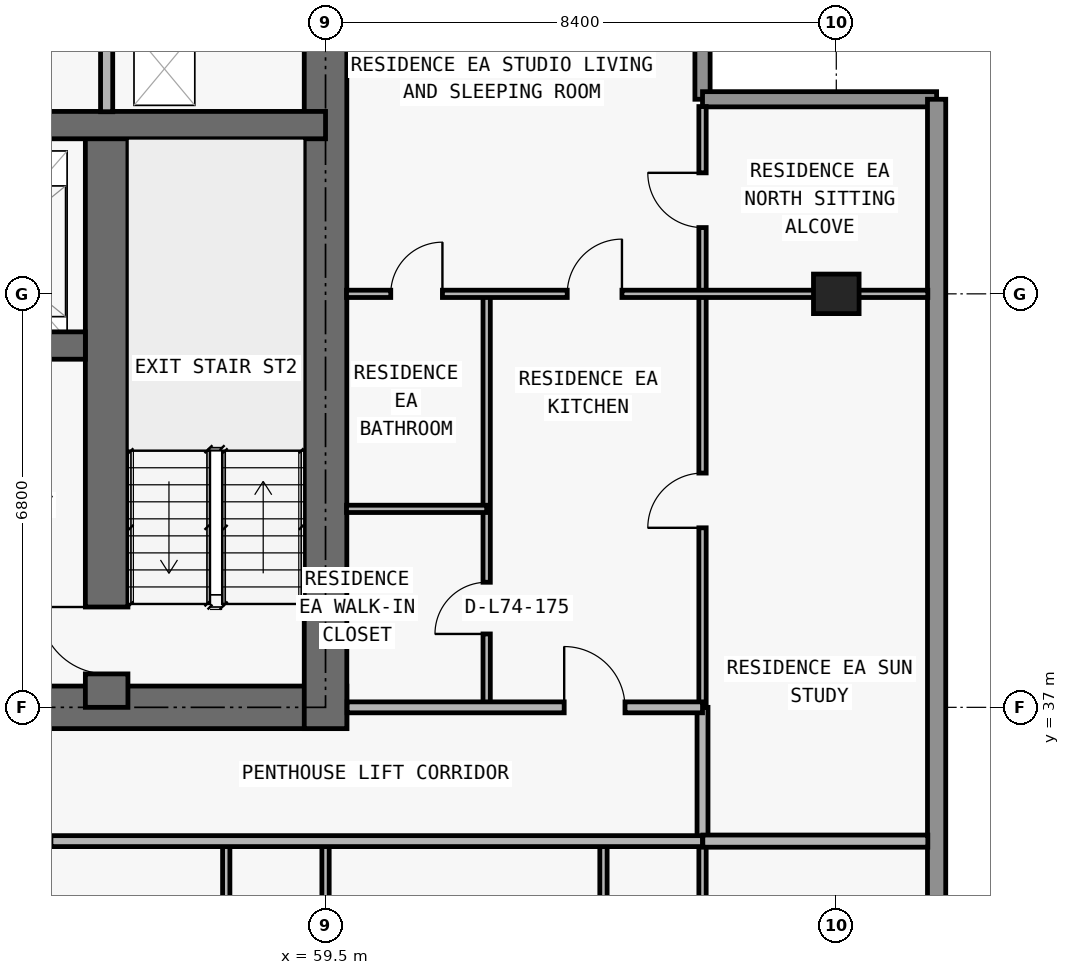
"""IFC4 building model, lengths in metres.
Left out: names, types, materials, properties, quantities, classifications, styles, units other than length and angle.
Written with IfcOpenShell. Run it as: python <this file> out.ifc"""

import sys

from ifc_helpers import new_model, si_unit, direction, frame, frame_2d, origin, origin_2d, place, context, subcontext, project, spatial, rectangle, extrude, element, fill, save


model = new_model("IFC4")
c1 = context("Model", 3, precision=1e-05, world=origin(), true_north=direction((0.0, 1.0)))
c2 = subcontext(c1, "Body", "Model", "MODEL_VIEW")
j1 = project(units=[si_unit("LENGTHUNIT", "METRE"), si_unit("PLANEANGLEUNIT", "RADIAN")], contexts=[c1])
p1 = place(None, origin())
s1 = spatial("IfcSite", under=j1, at=p1, CompositionType="ELEMENT")
p2 = place(p1, origin())
s2 = spatial("IfcBuilding", under=s1, at=p2, CompositionType="ELEMENT")
p3 = place(p2, frame((0.0, 0.0, 262.8)))
s3 = spatial("IfcBuildingStorey", under=s2, at=p3, CompositionType="ELEMENT", Elevation=262.8)
p4 = place(p3, frame((67.9, 43.8, 0.0), z_axis=(0.0, 0.0, 1.0), x_axis=(1.0, 0.0, 0.0)))
e1 = element("IfcColumn", 1, at=p4, inside=s3, PredefinedType="COLUMN", context=c2, shape_type="SweptSolid", body=[
    extrude(rectangle(XDim=0.75, YDim=0.65, at=origin_2d()), origin(), (0.0, 0.0, 1.0), 3.05),
])
p5 = place(p3, frame((17.95, 37.0, 0.0), z_axis=(0.0, 0.0, 1.0), x_axis=(1.0, 0.0, 0.0)))
e2 = element("IfcWall", 2, at=p5, inside=s3, PredefinedType="SHEAR", context=c2, shape_type="SweptSolid", body=[
    extrude(rectangle(XDim=41.9, YDim=0.7, at=frame_2d((20.95, 0.0))), origin(), (0.0, 0.0, 1.0), 3.05),
])
p6 = place(p5, frame((14.35, 0.0, 0.0)))
e3 = element("IfcOpeningElement", 3, at=p6, cuts=e2, PredefinedType="OPENING", context=c2, shape_type="SweptSolid", body=[
    extrude(rectangle(XDim=1.1, YDim=2.15, at=frame_2d((0.55, 1.075))), frame((0.0, 0.36, 0.0), z_axis=(0.0, -1.0, 0.0), x_axis=(1.0, 0.0, 0.0)), (0.0, 0.0, 1.0), 0.72),
])
p7 = place(p5, frame((6.2, 0.0, 0.0)))
e4 = element("IfcOpeningElement", 4, at=p7, cuts=e2, PredefinedType="OPENING", context=c2, shape_type="SweptSolid", body=[
    extrude(rectangle(XDim=1.05, YDim=2.15, at=frame_2d((0.525, 1.075))), frame((0.0, 0.36, 0.0), z_axis=(0.0, -1.0, 0.0), x_axis=(1.0, 0.0, 0.0)), (0.0, 0.0, 1.0), 0.72),
])
p8 = place(p5, frame((34.7, 0.0, 0.0)))
e5 = element("IfcOpeningElement", 5, at=p8, cuts=e2, PredefinedType="OPENING", context=c2, shape_type="SweptSolid", body=[
    extrude(rectangle(XDim=1.05, YDim=2.15, at=frame_2d((0.525, 1.075))), frame((0.0, 0.36, 0.0), z_axis=(0.0, -1.0, 0.0), x_axis=(1.0, 0.0, 0.0)), (0.0, 0.0, 1.0), 0.72),
])
p9 = place(p5, frame((10.812, 0.0, 0.0)))
e6 = element("IfcOpeningElement", 6, at=p9, cuts=e2, PredefinedType="OPENING", context=c2, shape_type="SweptSolid", body=[
    extrude(rectangle(XDim=1.05, YDim=2.15, at=frame_2d((0.525, 1.075))), frame((0.0, 0.36, 0.0), z_axis=(0.0, -1.0, 0.0), x_axis=(1.0, 0.0, 0.0)), (0.0, 0.0, 1.0), 0.72),
])
p10 = place(p5, frame((24.05, 0.0, 0.0)))
e7 = element("IfcOpeningElement", 7, at=p10, cuts=e2, PredefinedType="OPENING", context=c2, shape_type="SweptSolid", body=[
    extrude(rectangle(XDim=1.05, YDim=2.15, at=frame_2d((0.525, 1.075))), frame((0.0, 0.36, 0.0), z_axis=(0.0, -1.0, 0.0), x_axis=(1.0, 0.0, 0.0)), (0.0, 0.0, 1.0), 0.72),
])
p11 = place(p3, frame((59.5, 36.65, 0.0), z_axis=(0.0, 0.0, 1.0), x_axis=(0.0, 1.0, 0.0)))
e8 = element("IfcWall", 8, at=p11, inside=s3, PredefinedType="SHEAR", context=c2, shape_type="SweptSolid", body=[
    extrude(rectangle(XDim=13.95, YDim=0.7, at=frame_2d((6.975, 0.0))), origin(), (0.0, 0.0, 1.0), 3.05),
])
p12 = place(p3, frame((55.9, 37.0, 0.0), z_axis=(0.0, 0.0, 1.0), x_axis=(0.0, 1.0, 0.0)))
e9 = element("IfcWall", 9, at=p12, inside=s3, PredefinedType="SHEAR", context=c2, shape_type="SweptSolid", body=[
    extrude(rectangle(XDim=9.575, YDim=0.7, at=frame_2d((4.788, 0.0))), origin(), (0.0, 0.0, 1.0), 3.05),
])
p13 = place(p12, frame((0.55, 0.0, 0.0)))
e10 = element("IfcOpeningElement", 10, at=p13, cuts=e9, PredefinedType="OPENING", context=c2, shape_type="SweptSolid", body=[
    extrude(rectangle(XDim=1.1, YDim=2.15, at=frame_2d((0.55, 1.075))), frame((0.0, 0.36, 0.0), z_axis=(0.0, -1.0, 0.0), x_axis=(1.0, 0.0, 0.0)), (0.0, 0.0, 1.0), 0.72),
])
p14 = place(p3, frame((22.25, 42.95, 0.0), z_axis=(0.0, 0.0, 1.0), x_axis=(1.0, 0.0, 0.0)))
e11 = element("IfcWall", 11, at=p14, inside=s3, PredefinedType="SHEAR", context=c2, shape_type="SweptSolid", body=[
    extrude(rectangle(XDim=33.3, YDim=0.45, at=frame_2d((16.65, 0.0))), origin(), (0.0, 0.0, 1.0), 3.05),
])
p15 = place(p14, frame((1.05, 0.0, 0.0)))
e12 = element("IfcOpeningElement", 12, at=p15, cuts=e11, PredefinedType="OPENING", context=c2, shape_type="SweptSolid", body=[
    extrude(rectangle(XDim=1.2, YDim=2.2, at=frame_2d((0.6, 1.1))), frame((0.0, 0.235, 0.0), z_axis=(0.0, -1.0, 0.0), x_axis=(1.0, 0.0, 0.0)), (0.0, 0.0, 1.0), 0.47),
])
p16 = place(p14, frame((31.05, 0.0, 0.0)))
e13 = element("IfcOpeningElement", 13, at=p16, cuts=e11, PredefinedType="OPENING", context=c2, shape_type="SweptSolid", body=[
    extrude(rectangle(XDim=1.2, YDim=2.2, at=frame_2d((0.6, 1.1))), frame((0.0, 0.235, 0.0), z_axis=(0.0, -1.0, 0.0), x_axis=(1.0, 0.0, 0.0)), (0.0, 0.0, 1.0), 0.47),
])
p17 = place(p14, frame((26.45, 0.0, 0.0)))
e14 = element("IfcOpeningElement", 14, at=p17, cuts=e11, PredefinedType="OPENING", context=c2, shape_type="SweptSolid", body=[
    extrude(rectangle(XDim=1.1, YDim=2.2, at=frame_2d((0.55, 1.1))), frame((0.0, 0.235, 0.0), z_axis=(0.0, -1.0, 0.0), x_axis=(1.0, 0.0, 0.0)), (0.0, 0.0, 1.0), 0.47),
])
p18 = place(p14, frame((5.95, 0.0, 0.0)))
e15 = element("IfcOpeningElement", 15, at=p18, cuts=e11, PredefinedType="OPENING", context=c2, shape_type="SweptSolid", body=[
    extrude(rectangle(XDim=1.1, YDim=2.2, at=frame_2d((0.55, 1.1))), frame((0.0, 0.235, 0.0), z_axis=(0.0, -1.0, 0.0), x_axis=(1.0, 0.0, 0.0)), (0.0, 0.0, 1.0), 0.47),
])
p19 = place(p14, frame((3.625, 0.0, 0.0)))
e16 = element("IfcOpeningElement", 16, at=p19, cuts=e11, PredefinedType="OPENING", context=c2, shape_type="SweptSolid", body=[
    extrude(rectangle(XDim=1.05, YDim=2.15, at=frame_2d((0.525, 1.075))), frame((0.0, 0.235, 0.0), z_axis=(0.0, -1.0, 0.0), x_axis=(1.0, 0.0, 0.0)), (0.0, 0.0, 1.0), 0.47),
])
p20 = place(p14, frame((28.675, 0.0, 0.0)))
e17 = element("IfcOpeningElement", 17, at=p20, cuts=e11, PredefinedType="OPENING", context=c2, shape_type="SweptSolid", body=[
    extrude(rectangle(XDim=1.05, YDim=2.15, at=frame_2d((0.525, 1.075))), frame((0.0, 0.235, 0.0), z_axis=(0.0, -1.0, 0.0), x_axis=(1.0, 0.0, 0.0)), (0.0, 0.0, 1.0), 0.47),
])
p21 = place(p14, frame((14.7, 0.0, 0.0)))
e18 = element("IfcOpeningElement", 18, at=p21, cuts=e11, PredefinedType="OPENING", context=c2, shape_type="SweptSolid", body=[
    extrude(rectangle(XDim=1.0, YDim=2.2, at=frame_2d((0.5, 1.1))), frame((0.0, 0.235, 0.0), z_axis=(0.0, -1.0, 0.0), x_axis=(1.0, 0.0, 0.0)), (0.0, 0.0, 1.0), 0.47),
])
p22 = place(p14, frame((21.45, 0.0, 0.0)))
e19 = element("IfcOpeningElement", 19, at=p22, cuts=e11, PredefinedType="OPENING", context=c2, shape_type="SweptSolid", body=[
    extrude(rectangle(XDim=1.0, YDim=2.2, at=frame_2d((0.5, 1.1))), frame((0.0, 0.235, 0.0), z_axis=(0.0, -1.0, 0.0), x_axis=(1.0, 0.0, 0.0)), (0.0, 0.0, 1.0), 0.47),
])
p23 = place(p3, frame((18.3, 46.575, 0.0), z_axis=(0.0, 0.0, 1.0), x_axis=(1.0, 0.0, 0.0)))
e20 = element("IfcWall", 20, at=p23, inside=s3, PredefinedType="SHEAR", context=c2, shape_type="SweptSolid", body=[
    extrude(rectangle(XDim=41.2, YDim=0.45, at=frame_2d((20.6, 0.0))), origin(), (0.0, 0.0, 1.0), 3.05),
])
p24 = place(p23, frame((7.6, 0.0, 0.0)))
e21 = element("IfcOpeningElement", 21, at=p24, cuts=e20, PredefinedType="OPENING", context=c2, shape_type="SweptSolid", body=[
    extrude(rectangle(XDim=1.0, YDim=2.2, at=frame_2d((0.5, 1.1))), frame((0.0, 0.235, 0.0), z_axis=(0.0, -1.0, 0.0), x_axis=(1.0, 0.0, 0.0)), (0.0, 0.0, 1.0), 0.47),
])
p25 = place(p23, frame((32.625, 0.0, 0.0)))
e22 = element("IfcOpeningElement", 22, at=p25, cuts=e20, PredefinedType="OPENING", context=c2, shape_type="SweptSolid", body=[
    extrude(rectangle(XDim=1.05, YDim=2.15, at=frame_2d((0.525, 1.075))), frame((0.0, 0.235, 0.0), z_axis=(0.0, -1.0, 0.0), x_axis=(1.0, 0.0, 0.0)), (0.0, 0.0, 1.0), 0.47),
])
p26 = place(p3, frame((65.7, 50.45, 0.0), z_axis=(0.0, 0.0, 1.0), x_axis=(0.0, -1.0, 0.0)))
e23 = element("IfcWall", 23, at=p26, inside=s3, PredefinedType="ELEMENTEDWALL", context=c2, shape_type="SweptSolid", body=[
    extrude(rectangle(XDim=3.45, YDim=0.25, at=frame_2d((1.725, 0.0))), origin(), (0.0, 0.0, 1.0), 3.05),
])
p27 = place(p3, frame((65.7, 47.0, 0.0), z_axis=(0.0, 0.0, 1.0), x_axis=(1.0, 0.0, 0.0)))
e24 = element("IfcWall", 24, at=p27, inside=s3, PredefinedType="ELEMENTEDWALL", context=c2, shape_type="SweptSolid", body=[
    extrude(rectangle(XDim=3.85, YDim=0.25, at=frame_2d((1.925, 0.0))), origin(), (0.0, 0.0, 1.0), 3.05),
])
p28 = place(p3, frame((69.55, 47.0, 0.0), z_axis=(0.0, 0.0, 1.0), x_axis=(0.0, -1.0, 0.0)))
e25 = element("IfcWall", 25, at=p28, inside=s3, PredefinedType="STANDARD", context=c2, shape_type="SweptSolid", body=[
    extrude(rectangle(XDim=16.85, YDim=0.3, at=frame_2d((8.425, 0.0))), origin(), (0.0, 0.0, 1.0), 3.05),
])
p29 = place(p3, frame((55.9, 46.795, 0.0), z_axis=(0.0, 0.0, 1.0), x_axis=(0.0, 1.0, 0.0)))
e26 = element("IfcWall", 26, at=p29, inside=s3, PredefinedType="PARTITIONING", context=c2, shape_type="SweptSolid", body=[
    extrude(rectangle(XDim=3.16, YDim=0.2, at=frame_2d((1.58, 0.0))), origin(), (0.0, 0.0, 1.0), 3.05),
])
p30 = place(p3, frame((57.867, 30.84, 0.0), z_axis=(0.0, 0.0, 1.0), x_axis=(0.0, 1.0, 0.0)))
e27 = element("IfcWall", 27, at=p30, inside=s3, PredefinedType="PARTITIONING", context=c2, shape_type="SweptSolid", body=[
    extrude(rectangle(XDim=3.96, YDim=0.12, at=frame_2d((1.98, 0.0))), origin(), (0.0, 0.0, 1.0), 3.05),
])
p31 = place(p30, frame((1.555, 0.0, 0.0)))
e28 = element("IfcOpeningElement", 28, at=p31, cuts=e27, PredefinedType="OPENING", context=c2, shape_type="SweptSolid", body=[
    extrude(rectangle(XDim=0.85, YDim=2.1, at=frame_2d((0.425, 1.05))), frame((0.0, 0.07, 0.0), z_axis=(0.0, -1.0, 0.0), x_axis=(1.0, 0.0, 0.0)), (0.0, 0.0, 1.0), 0.14),
])
p32 = place(p3, frame((59.5, 30.84, 0.0), z_axis=(0.0, 0.0, 1.0), x_axis=(0.0, 1.0, 0.0)))
e29 = element("IfcWall", 29, at=p32, inside=s3, PredefinedType="PARTITIONING", context=c2, shape_type="SweptSolid", body=[
    extrude(rectangle(XDim=3.96, YDim=0.12, at=frame_2d((1.98, 0.0))), origin(), (0.0, 0.0, 1.0), 2.263),
])
p33 = place(p3, frame((62.15, 37.0, 0.0), z_axis=(0.0, 0.0, 1.0), x_axis=(0.0, 1.0, 0.0)))
e30 = element("IfcWall", 30, at=p33, inside=s3, PredefinedType="PARTITIONING", context=c2, shape_type="SweptSolid", body=[
    extrude(rectangle(XDim=6.8, YDim=0.12, at=frame_2d((3.4, 0.0))), origin(), (0.0, 0.0, 1.0), 3.05),
])
p34 = place(p33, frame((1.207, 0.0, 0.0)))
e31 = element("IfcOpeningElement", 31, at=p34, cuts=e30, PredefinedType="OPENING", context=c2, shape_type="SweptSolid", body=[
    extrude(rectangle(XDim=0.85, YDim=2.1, at=frame_2d((0.425, 1.05))), frame((0.0, 0.07, 0.0), z_axis=(0.0, -1.0, 0.0), x_axis=(1.0, 0.0, 0.0)), (0.0, 0.0, 1.0), 0.14),
])
p35 = place(p3, frame((64.071, 30.84, 0.0), z_axis=(0.0, 0.0, 1.0), x_axis=(0.0, 1.0, 0.0)))
e32 = element("IfcWall", 32, at=p35, inside=s3, PredefinedType="PARTITIONING", context=c2, shape_type="SweptSolid", body=[
    extrude(rectangle(XDim=3.96, YDim=0.12, at=frame_2d((1.98, 0.0))), origin(), (0.0, 0.0, 1.0), 3.05),
])
p36 = place(p35, frame((1.555, 0.0, 0.0)))
e33 = element("IfcOpeningElement", 33, at=p36, cuts=e32, PredefinedType="OPENING", context=c2, shape_type="SweptSolid", body=[
    extrude(rectangle(XDim=0.85, YDim=2.1, at=frame_2d((0.425, 1.05))), frame((0.0, 0.07, 0.0), z_axis=(0.0, -1.0, 0.0), x_axis=(1.0, 0.0, 0.0)), (0.0, 0.0, 1.0), 0.14),
])
p37 = place(p3, frame((65.7, 30.84, 0.0), z_axis=(0.0, 0.0, 1.0), x_axis=(0.0, 1.0, 0.0)))
e34 = element("IfcWall", 34, at=p37, inside=s3, PredefinedType="PARTITIONING", context=c2, shape_type="SweptSolid", body=[
    extrude(rectangle(XDim=3.96, YDim=0.12, at=frame_2d((1.98, 0.0))), origin(), (0.0, 0.0, 1.0), 2.629),
])
p38 = place(p3, frame((65.7, 34.805, 0.0), z_axis=(0.0, 0.0, 1.0), x_axis=(0.0, 1.0, 0.0)))
e35 = element("IfcWall", 35, at=p38, inside=s3, PredefinedType="PARTITIONING", context=c2, shape_type="SweptSolid", body=[
    extrude(rectangle(XDim=2.195, YDim=0.18, at=frame_2d((1.098, 0.0))), origin(), (0.0, 0.0, 1.0), 2.629),
])
p39 = place(p3, frame((65.7, 37.005, 0.0), z_axis=(0.0, 0.0, 1.0), x_axis=(0.0, 1.0, 0.0)))
e36 = element("IfcWall", 36, at=p39, inside=s3, PredefinedType="PARTITIONING", context=c2, shape_type="SweptSolid", body=[
    extrude(rectangle(XDim=9.875, YDim=0.12, at=frame_2d((4.938, 0.0))), origin(), (0.0, 0.0, 1.0), 2.629),
])
p40 = place(p39, frame((2.948, 0.0, 0.0)))
e37 = element("IfcOpeningElement", 37, at=p40, cuts=e36, PredefinedType="OPENING", context=c2, shape_type="SweptSolid", body=[
    extrude(rectangle(XDim=0.9, YDim=2.15, at=frame_2d((0.45, 1.075))), frame((0.0, 0.07, 0.0), z_axis=(0.0, -1.0, 0.0), x_axis=(1.0, 0.0, 0.0)), (0.0, 0.0, 1.0), 0.14),
])
p41 = place(p39, frame((7.885, 0.0, 0.0)))
e38 = element("IfcOpeningElement", 38, at=p41, cuts=e36, PredefinedType="OPENING", context=c2, shape_type="SweptSolid", body=[
    extrude(rectangle(XDim=0.9, YDim=2.15, at=frame_2d((0.45, 1.075))), frame((0.0, 0.07, 0.0), z_axis=(0.0, -1.0, 0.0), x_axis=(1.0, 0.0, 0.0)), (0.0, 0.0, 1.0), 0.14),
])
p42 = place(p3, frame((31.5, 34.8, 0.0), z_axis=(0.0, 0.0, 1.0), x_axis=(1.0, 0.0, 0.0)))
e39 = element("IfcWall", 39, at=p42, inside=s3, PredefinedType="PARTITIONING", context=c2, shape_type="SweptSolid", body=[
    extrude(rectangle(XDim=34.2, YDim=0.18, at=frame_2d((17.1, 0.0))), origin(), (0.0, 0.0, 1.0), 3.05),
])
p43 = place(p42, frame((5.6, 0.0, 0.0)))
e40 = element("IfcOpeningElement", 40, at=p43, cuts=e39, PredefinedType="OPENING", context=c2, shape_type="SweptSolid", body=[
    extrude(rectangle(XDim=1.0, YDim=2.2, at=frame_2d((0.5, 1.1))), frame((0.0, 0.1, 0.0), z_axis=(0.0, -1.0, 0.0), x_axis=(1.0, 0.0, 0.0)), (0.0, 0.0, 1.0), 0.2),
])
p44 = place(p42, frame((13.799, 0.0, 0.0)))
e41 = element("IfcOpeningElement", 41, at=p44, cuts=e39, PredefinedType="OPENING", context=c2, shape_type="SweptSolid", body=[
    extrude(rectangle(XDim=1.0, YDim=2.2, at=frame_2d((0.5, 1.1))), frame((0.0, 0.1, 0.0), z_axis=(0.0, -1.0, 0.0), x_axis=(1.0, 0.0, 0.0)), (0.0, 0.0, 1.0), 0.2),
])
p45 = place(p42, frame((22.483, 0.0, 0.0)))
e42 = element("IfcOpeningElement", 42, at=p45, cuts=e39, PredefinedType="OPENING", context=c2, shape_type="SweptSolid", body=[
    extrude(rectangle(XDim=1.0, YDim=2.2, at=frame_2d((0.5, 1.1))), frame((0.0, 0.1, 0.0), z_axis=(0.0, -1.0, 0.0), x_axis=(1.0, 0.0, 0.0)), (0.0, 0.0, 1.0), 0.2),
])
p46 = place(p3, frame((65.705, 34.8, 0.0), z_axis=(0.0, 0.0, 1.0), x_axis=(1.0, 0.0, 0.0)))
e43 = element("IfcWall", 43, at=p46, inside=s3, PredefinedType="PARTITIONING", context=c2, shape_type="SweptSolid", body=[
    extrude(rectangle(XDim=3.7, YDim=0.2, at=frame_2d((1.85, 0.0))), origin(), (0.0, 0.0, 1.0), 3.05),
])
p47 = place(p3, frame((59.855, 37.0, 0.0), z_axis=(0.0, 0.0, 1.0), x_axis=(1.0, 0.0, 0.0)))
e44 = element("IfcWall", 44, at=p47, inside=s3, PredefinedType="PARTITIONING", context=c2, shape_type="SweptSolid", body=[
    extrude(rectangle(XDim=5.845, YDim=0.18, at=frame_2d((2.922, 0.0))), origin(), (0.0, 0.0, 1.0), 3.05),
])
p48 = place(p47, frame((3.57, 0.0, 0.0)))
e45 = element("IfcOpeningElement", 45, at=p48, cuts=e44, PredefinedType="OPENING", context=c2, shape_type="SweptSolid", body=[
    extrude(rectangle(XDim=1.0, YDim=2.2, at=frame_2d((0.5, 1.1))), frame((0.0, 0.1, 0.0), z_axis=(0.0, -1.0, 0.0), x_axis=(1.0, 0.0, 0.0)), (0.0, 0.0, 1.0), 0.2),
])
p49 = place(p3, frame((59.845, 40.264, 0.0), z_axis=(0.0, 0.0, 1.0), x_axis=(1.0, 0.0, 0.0)))
e46 = element("IfcWall", 46, at=p49, inside=s3, PredefinedType="PARTITIONING", context=c2, shape_type="SweptSolid", body=[
    extrude(rectangle(XDim=2.305, YDim=0.12, at=frame_2d((1.152, 0.0))), origin(), (0.0, 0.0, 1.0), 3.05),
])
p50 = place(p3, frame((59.845, 43.8, 0.0), z_axis=(0.0, 0.0, 1.0), x_axis=(1.0, 0.0, 0.0)))
e47 = element("IfcWall", 47, at=p50, inside=s3, PredefinedType="PARTITIONING", context=c2, shape_type="SweptSolid", body=[
    extrude(rectangle(XDim=9.56, YDim=0.12, at=frame_2d((4.78, 0.0))), origin(), (0.0, 0.0, 1.0), 2.418),
])
p51 = place(p50, frame((3.63, 0.0, 0.0)))
e48 = element("IfcOpeningElement", 48, at=p51, cuts=e47, PredefinedType="OPENING", context=c2, shape_type="SweptSolid", body=[
    extrude(rectangle(XDim=0.9, YDim=2.15, at=frame_2d((0.45, 1.075))), frame((0.0, 0.07, 0.0), z_axis=(0.0, -1.0, 0.0), x_axis=(1.0, 0.0, 0.0)), (0.0, 0.0, 1.0), 0.14),
])
p52 = place(p50, frame((0.728, 0.0, 0.0)))
e49 = element("IfcOpeningElement", 49, at=p52, cuts=e47, PredefinedType="OPENING", context=c2, shape_type="SweptSolid", body=[
    extrude(rectangle(XDim=0.85, YDim=2.1, at=frame_2d((0.425, 1.05))), frame((0.0, 0.07, 0.0), z_axis=(0.0, -1.0, 0.0), x_axis=(1.0, 0.0, 0.0)), (0.0, 0.0, 1.0), 0.14),
])
p53 = place(p13, origin())
e50 = element("IfcDoor", 50, at=p53, inside=s3, OperationType="SINGLE_SWING_RIGHT", PredefinedType="DOOR", context=c2, shape_type="SweptSolid", body=[
    extrude(rectangle(XDim=1.1, YDim=2.15, at=frame_2d((0.55, 1.075))), frame((0.0, 0.025, 0.0), z_axis=(0.0, -1.0, 0.0), x_axis=(1.0, 0.0, 0.0)), (0.0, 0.0, 1.0), 0.05),
])
fill(e10, e50)
p54 = place(p48, origin())
e51 = element("IfcDoor", 51, at=p54, inside=s3, OperationType="SINGLE_SWING_LEFT", PredefinedType="DOOR", context=c2, shape_type="SweptSolid", body=[
    extrude(rectangle(XDim=1.0, YDim=2.2, at=frame_2d((0.5, 1.1))), frame((0.0, 0.025, 0.0), z_axis=(0.0, -1.0, 0.0), x_axis=(1.0, 0.0, 0.0)), (0.0, 0.0, 1.0), 0.05),
])
fill(e45, e51)
p55 = place(p51, origin())
e52 = element("IfcDoor", 52, at=p55, inside=s3, OperationType="SINGLE_SWING_RIGHT", PredefinedType="DOOR", context=c2, shape_type="SweptSolid", body=[
    extrude(rectangle(XDim=0.9, YDim=2.15, at=frame_2d((0.45, 1.075))), frame((0.0, 0.025, 0.0), z_axis=(0.0, -1.0, 0.0), x_axis=(1.0, 0.0, 0.0)), (0.0, 0.0, 1.0), 0.05),
])
fill(e48, e52)
p56 = place(p34, origin())
e53 = element("IfcDoor", 53, at=p56, inside=s3, OperationType="SINGLE_SWING_LEFT", PredefinedType="DOOR", context=c2, shape_type="SweptSolid", body=[
    extrude(rectangle(XDim=0.85, YDim=2.1, at=frame_2d((0.425, 1.05))), frame((0.0, 0.025, 0.0), z_axis=(0.0, -1.0, 0.0), x_axis=(1.0, 0.0, 0.0)), (0.0, 0.0, 1.0), 0.05),
])
fill(e31, e53)
p57 = place(p52, origin())
e54 = element("IfcDoor", 54, at=p57, inside=s3, OperationType="SINGLE_SWING_RIGHT", PredefinedType="DOOR", context=c2, shape_type="SweptSolid", body=[
    extrude(rectangle(XDim=0.85, YDim=2.1, at=frame_2d((0.425, 1.05))), frame((0.0, 0.025, 0.0), z_axis=(0.0, -1.0, 0.0), x_axis=(1.0, 0.0, 0.0)), (0.0, 0.0, 1.0), 0.05),
])
fill(e49, e54)
p58 = place(p40, origin())
e55 = element("IfcDoor", 55, at=p58, inside=s3, OperationType="SINGLE_SWING_LEFT", PredefinedType="DOOR", context=c2, shape_type="SweptSolid", body=[
    extrude(rectangle(XDim=0.9, YDim=2.15, at=frame_2d((0.45, 1.075))), frame((0.0, 0.025, 0.0), z_axis=(0.0, -1.0, 0.0), x_axis=(1.0, 0.0, 0.0)), (0.0, 0.0, 1.0), 0.05),
])
fill(e37, e55)
p59 = place(p41, origin())
e56 = element("IfcDoor", 56, at=p59, inside=s3, OperationType="SINGLE_SWING_RIGHT", PredefinedType="DOOR", context=c2, shape_type="SweptSolid", body=[
    extrude(rectangle(XDim=0.9, YDim=2.15, at=frame_2d((0.45, 1.075))), frame((0.0, 0.025, 0.0), z_axis=(0.0, -1.0, 0.0), x_axis=(1.0, 0.0, 0.0)), (0.0, 0.0, 1.0), 0.05),
])
fill(e38, e56)
save(model, sys.argv[1])
